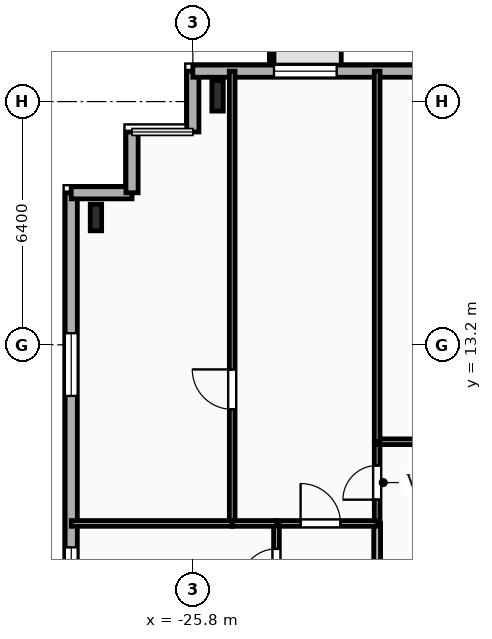
"""IFC4 building model, lengths in metres.
Left out: names, types, materials, properties, quantities, classifications, styles, units other than length and angle.
Written with IfcOpenShell. Run it as: python <this file> out.ifc"""

import sys

from ifc_helpers import new_model, si_unit, direction, frame, frame_2d, origin, origin_2d, place, context, subcontext, project, spatial, rectangle, i_section, extrude, element, fill, save


model = new_model("IFC4")
c1 = context("Model", 3, precision=1e-05, world=origin(), true_north=direction((0.0, 1.0)))
c2 = subcontext(c1, "Body", "Model", "MODEL_VIEW")
j1 = project(units=[si_unit("LENGTHUNIT", "METRE"), si_unit("PLANEANGLEUNIT", "RADIAN")], contexts=[c1])
p1 = place(None, origin())
s1 = spatial("IfcSite", under=j1, at=p1, CompositionType="ELEMENT")
p2 = place(p1, origin())
s2 = spatial("IfcBuilding", under=s1, at=p2, CompositionType="ELEMENT")
p3 = place(p2, frame((0.0, 0.0, 171.2)))
s3 = spatial("IfcBuildingStorey", under=s2, at=p3, CompositionType="ELEMENT", Elevation=171.2)
p4 = place(p3, frame((-25.15, 19.75, 0.0), z_axis=(0.0, 0.0, 1.0), x_axis=(1.0, 0.0, 0.0)))
e1 = element("IfcColumn", 1, at=p4, inside=s3, PredefinedType="COLUMN", context=c2, shape_type="SweptSolid", body=[
    extrude(i_section(OverallWidth=0.3, OverallDepth=0.8, WebThickness=0.018, FlangeThickness=0.033, FilletRadius=0.03, at=origin_2d()), origin(), (0.0, 0.0, 1.0), 3.35),
])
p5 = place(p3, frame((-28.35, 16.55, 0.0), z_axis=(0.0, 0.0, 1.0), x_axis=(1.0, 0.0, 0.0)))
e2 = element("IfcColumn", 2, at=p5, inside=s3, PredefinedType="COLUMN", context=c2, shape_type="SweptSolid", body=[
    extrude(i_section(OverallWidth=0.3, OverallDepth=0.7, WebThickness=0.017, FlangeThickness=0.032, FilletRadius=0.027, at=origin_2d()), origin(), (0.0, 0.0, 1.0), 3.35),
])
p6 = place(p3, frame((-29.0, -12.4, 0.0), z_axis=(0.0, 0.0, 1.0), x_axis=(0.0, 1.0, 0.0)))
e3 = element("IfcWall", 3, at=p6, inside=s3, PredefinedType="SOLIDWALL", context=c2, shape_type="SweptSolid", body=[
    extrude(rectangle(XDim=29.6, YDim=0.32, at=frame_2d((14.8, 0.0))), origin(), (0.0, 0.0, 1.0), 3.0),
])
p7 = place(p6, frame((2.855, 0.0, 0.85)))
e4 = element("IfcOpeningElement", 4, at=p7, cuts=e3, PredefinedType="OPENING", context=c2, shape_type="SweptSolid", body=[
    extrude(rectangle(XDim=1.65, YDim=1.85, at=frame_2d((0.825, 0.925))), frame((0.0, 0.17, 0.0), z_axis=(0.0, -1.0, 0.0), x_axis=(1.0, 0.0, 0.0)), (0.0, 0.0, 1.0), 0.34),
])
p8 = place(p6, frame((9.865, 0.0, 0.85)))
e5 = element("IfcOpeningElement", 5, at=p8, cuts=e3, PredefinedType="OPENING", context=c2, shape_type="SweptSolid", body=[
    extrude(rectangle(XDim=1.95, YDim=1.85, at=frame_2d((0.975, 0.925))), frame((0.0, 0.17, 0.0), z_axis=(0.0, -1.0, 0.0), x_axis=(1.0, 0.0, 0.0)), (0.0, 0.0, 1.0), 0.34),
])
p9 = place(p6, frame((13.13, 0.0, 0.85)))
e6 = element("IfcOpeningElement", 6, at=p9, cuts=e3, PredefinedType="OPENING", context=c2, shape_type="SweptSolid", body=[
    extrude(rectangle(XDim=1.5, YDim=1.85, at=frame_2d((0.75, 0.925))), frame((0.0, 0.17, 0.0), z_axis=(0.0, -1.0, 0.0), x_axis=(1.0, 0.0, 0.0)), (0.0, 0.0, 1.0), 0.34),
])
p10 = place(p6, frame((15.93, 0.0, 0.85)))
e7 = element("IfcOpeningElement", 7, at=p10, cuts=e3, PredefinedType="OPENING", context=c2, shape_type="SweptSolid", body=[
    extrude(rectangle(XDim=1.5, YDim=1.85, at=frame_2d((0.75, 0.925))), frame((0.0, 0.17, 0.0), z_axis=(0.0, -1.0, 0.0), x_axis=(1.0, 0.0, 0.0)), (0.0, 0.0, 1.0), 0.34),
])
p11 = place(p6, frame((18.77, 0.0, 0.85)))
e8 = element("IfcOpeningElement", 8, at=p11, cuts=e3, PredefinedType="OPENING", context=c2, shape_type="SweptSolid", body=[
    extrude(rectangle(XDim=1.5, YDim=1.85, at=frame_2d((0.75, 0.925))), frame((0.0, 0.17, 0.0), z_axis=(0.0, -1.0, 0.0), x_axis=(1.0, 0.0, 0.0)), (0.0, 0.0, 1.0), 0.34),
])
p12 = place(p6, frame((24.255, 0.0, 0.85)))
e9 = element("IfcOpeningElement", 9, at=p12, cuts=e3, PredefinedType="OPENING", context=c2, shape_type="SweptSolid", body=[
    extrude(rectangle(XDim=1.65, YDim=1.85, at=frame_2d((0.825, 0.925))), frame((0.0, 0.17, 0.0), z_axis=(0.0, -1.0, 0.0), x_axis=(1.0, 0.0, 0.0)), (0.0, 0.0, 1.0), 0.34),
])
for number, where, z_axis, x_axis in (
    (10, (-29.0, 17.2, 0.0), (0.0, 0.0, 1.0), (1.0, 0.0, 0.0)),
    (11, (-27.4, 17.2, 0.0), (0.0, 0.0, 1.0), (0.0, 1.0, 0.0)),
):
    element("IfcWall", number, at=place(p3, frame(where, z_axis=z_axis, x_axis=x_axis)), inside=s3, PredefinedType="SOLIDWALL", context=c2, shape_type="SweptSolid", body=[
        extrude(rectangle(XDim=1.6, YDim=0.32, at=frame_2d((0.8, 0.0))), origin(), (0.0, 0.0, 1.0), 3.0),
    ])
p13 = place(p3, frame((-25.8, 18.8, 0.0), z_axis=(0.0, 0.0, 1.0), x_axis=(0.0, 1.0, 0.0)))
e12 = element("IfcWall", 12, at=p13, inside=s3, PredefinedType="SOLIDWALL", context=c2, shape_type="SweptSolid", body=[
    extrude(rectangle(XDim=1.6, YDim=0.32, at=frame_2d((0.8, 0.0))), origin(), (0.0, 0.0, 1.0), 3.0),
])
p14 = place(p3, frame((-25.8, 20.4, 0.0), z_axis=(0.0, 0.0, 1.0), x_axis=(1.0, 0.0, 0.0)))
e13 = element("IfcWall", 13, at=p14, inside=s3, PredefinedType="SOLIDWALL", context=c2, shape_type="SweptSolid", body=[
    extrude(rectangle(XDim=49.6, YDim=0.32, at=frame_2d((24.8, 0.0))), origin(), (0.0, 0.0, 1.0), 3.0),
])
p15 = place(p14, frame((2.135, 0.0, 0.85)))
e14 = element("IfcOpeningElement", 14, at=p15, cuts=e13, PredefinedType="OPENING", context=c2, shape_type="SweptSolid", body=[
    extrude(rectangle(XDim=1.65, YDim=1.85, at=frame_2d((0.825, 0.925))), frame((0.0, 0.17, 0.0), z_axis=(0.0, -1.0, 0.0), x_axis=(1.0, 0.0, 0.0)), (0.0, 0.0, 1.0), 0.34),
])
p16 = place(p14, frame((6.295, 0.0, 0.85)))
e15 = element("IfcOpeningElement", 15, at=p16, cuts=e13, PredefinedType="OPENING", context=c2, shape_type="SweptSolid", body=[
    extrude(rectangle(XDim=1.65, YDim=1.85, at=frame_2d((0.825, 0.925))), frame((0.0, 0.17, 0.0), z_axis=(0.0, -1.0, 0.0), x_axis=(1.0, 0.0, 0.0)), (0.0, 0.0, 1.0), 0.34),
])
p17 = place(p14, frame((10.775, 0.0, 0.85)))
e16 = element("IfcOpeningElement", 16, at=p17, cuts=e13, PredefinedType="OPENING", context=c2, shape_type="SweptSolid", body=[
    extrude(rectangle(XDim=1.65, YDim=1.85, at=frame_2d((0.825, 0.925))), frame((0.0, 0.17, 0.0), z_axis=(0.0, -1.0, 0.0), x_axis=(1.0, 0.0, 0.0)), (0.0, 0.0, 1.0), 0.34),
])
p18 = place(p14, frame((18.49, 0.0, 0.85)))
e17 = element("IfcOpeningElement", 17, at=p18, cuts=e13, PredefinedType="OPENING", context=c2, shape_type="SweptSolid", body=[
    extrude(rectangle(XDim=1.5, YDim=1.85, at=frame_2d((0.75, 0.925))), frame((0.0, 0.17, 0.0), z_axis=(0.0, -1.0, 0.0), x_axis=(1.0, 0.0, 0.0)), (0.0, 0.0, 1.0), 0.34),
])
p19 = place(p14, frame((25.34, 0.0, 0.85)))
e18 = element("IfcOpeningElement", 18, at=p19, cuts=e13, PredefinedType="OPENING", context=c2, shape_type="SweptSolid", body=[
    extrude(rectangle(XDim=2.2, YDim=1.85, at=frame_2d((1.1, 0.925))), frame((0.0, 0.17, 0.0), z_axis=(0.0, -1.0, 0.0), x_axis=(1.0, 0.0, 0.0)), (0.0, 0.0, 1.0), 0.34),
])
p20 = place(p14, frame((33.74, 0.0, 0.85)))
e19 = element("IfcOpeningElement", 19, at=p20, cuts=e13, PredefinedType="OPENING", context=c2, shape_type="SweptSolid", body=[
    extrude(rectangle(XDim=2.2, YDim=1.85, at=frame_2d((1.1, 0.925))), frame((0.0, 0.17, 0.0), z_axis=(0.0, -1.0, 0.0), x_axis=(1.0, 0.0, 0.0)), (0.0, 0.0, 1.0), 0.34),
])
p21 = place(p14, frame((42.095, 0.0, 0.85)))
e20 = element("IfcOpeningElement", 20, at=p21, cuts=e13, PredefinedType="OPENING", context=c2, shape_type="SweptSolid", body=[
    extrude(rectangle(XDim=1.65, YDim=1.85, at=frame_2d((0.825, 0.925))), frame((0.0, 0.17, 0.0), z_axis=(0.0, -1.0, 0.0), x_axis=(1.0, 0.0, 0.0)), (0.0, 0.0, 1.0), 0.34),
])
p22 = place(p14, frame((47.45, 0.0, 0.85)))
e21 = element("IfcOpeningElement", 21, at=p22, cuts=e13, PredefinedType="OPENING", context=c2, shape_type="SweptSolid", body=[
    extrude(rectangle(XDim=1.1, YDim=1.85, at=frame_2d((0.55, 0.925))), frame((0.0, 0.17, 0.0), z_axis=(0.0, -1.0, 0.0), x_axis=(1.0, 0.0, 0.0)), (0.0, 0.0, 1.0), 0.34),
])
p23 = place(p3, frame((-20.95, 8.5, 0.0), z_axis=(0.0, 0.0, 1.0), x_axis=(0.0, 1.0, 0.0)))
e22 = element("IfcWall", 22, at=p23, inside=s3, PredefinedType="PARTITIONING", context=c2, shape_type="SweptSolid", body=[
    extrude(rectangle(XDim=2.15, YDim=0.15, at=frame_2d((1.075, 0.0))), origin(), (0.0, 0.0, 1.0), 3.0),
])
p24 = place(p23, frame((0.625, 0.0, 0.0)))
e23 = element("IfcOpeningElement", 23, at=p24, cuts=e22, PredefinedType="OPENING", context=c2, shape_type="SweptSolid", body=[
    extrude(rectangle(XDim=0.9, YDim=2.1, at=frame_2d((0.45, 1.05))), frame((0.0, 0.085, 0.0), z_axis=(0.0, -1.0, 0.0), x_axis=(1.0, 0.0, 0.0)), (0.0, 0.0, 1.0), 0.17),
])
p25 = place(p3, frame((-20.95, 10.65, 0.0), z_axis=(0.0, 0.0, 1.0), x_axis=(1.0, 0.0, 0.0)))
e24 = element("IfcWall", 24, at=p25, inside=s3, PredefinedType="PARTITIONING", context=c2, shape_type="SweptSolid", body=[
    extrude(rectangle(XDim=4.49, YDim=0.15, at=frame_2d((2.245, 0.0))), origin(), (0.0, 0.0, 1.0), 3.0),
])
p26 = place(p25, frame((2.575, 0.0, 0.0)))
e25 = element("IfcOpeningElement", 25, at=p26, cuts=e24, PredefinedType="OPENING", context=c2, shape_type="SweptSolid", body=[
    extrude(rectangle(XDim=1.05, YDim=2.15, at=frame_2d((0.525, 1.075))), frame((0.0, 0.085, 0.0), z_axis=(0.0, -1.0, 0.0), x_axis=(1.0, 0.0, 0.0)), (0.0, 0.0, 1.0), 0.17),
])
p27 = place(p3, frame((-20.95, -5.6, 0.0), z_axis=(0.0, 0.0, 1.0), x_axis=(0.0, 1.0, 0.0)))
e26 = element("IfcWall", 26, at=p27, inside=s3, PredefinedType="PARTITIONING", context=c2, shape_type="SweptSolid", body=[
    extrude(rectangle(XDim=14.1, YDim=0.18, at=frame_2d((7.05, 0.0))), origin(), (0.0, 0.0, 1.0), 3.0),
])
p28 = place(p27, frame((5.058, 0.0, 0.0)))
e27 = element("IfcOpeningElement", 27, at=p28, cuts=e26, PredefinedType="OPENING", context=c2, shape_type="SweptSolid", body=[
    extrude(rectangle(XDim=1.0, YDim=2.15, at=frame_2d((0.5, 1.075))), frame((0.0, 0.1, 0.0), z_axis=(0.0, -1.0, 0.0), x_axis=(1.0, 0.0, 0.0)), (0.0, 0.0, 1.0), 0.2),
])
p29 = place(p3, frame((-23.6, 8.5, 0.0), z_axis=(0.0, 0.0, 1.0), x_axis=(1.0, 0.0, 0.0)))
e28 = element("IfcWall", 28, at=p29, inside=s3, PredefinedType="PARTITIONING", context=c2, shape_type="SweptSolid", body=[
    extrude(rectangle(XDim=2.65, YDim=0.15, at=frame_2d((1.325, 0.0))), origin(), (0.0, 0.0, 1.0), 3.0),
])
p30 = place(p29, frame((0.635, 0.0, 0.0)))
e29 = element("IfcOpeningElement", 29, at=p30, cuts=e28, PredefinedType="OPENING", context=c2, shape_type="SweptSolid", body=[
    extrude(rectangle(XDim=1.05, YDim=2.15, at=frame_2d((0.525, 1.075))), frame((0.0, 0.085, 0.0), z_axis=(0.0, -1.0, 0.0), x_axis=(1.0, 0.0, 0.0)), (0.0, 0.0, 1.0), 0.17),
])
p31 = place(p3, frame((-23.6, 5.68, 0.0), z_axis=(0.0, 0.0, 1.0), x_axis=(0.0, 1.0, 0.0)))
e30 = element("IfcWall", 30, at=p31, inside=s3, PredefinedType="PARTITIONING", context=c2, shape_type="SweptSolid", body=[
    extrude(rectangle(XDim=2.82, YDim=0.15, at=frame_2d((1.41, 0.0))), origin(), (0.0, 0.0, 1.0), 2.655),
])
p32 = place(p31, frame((1.201, 0.0, 0.0)))
e31 = element("IfcOpeningElement", 31, at=p32, cuts=e30, PredefinedType="OPENING", context=c2, shape_type="SweptSolid", body=[
    extrude(rectangle(XDim=0.95, YDim=2.1, at=frame_2d((0.475, 1.05))), frame((0.0, 0.085, 0.0), z_axis=(0.0, -1.0, 0.0), x_axis=(1.0, 0.0, 0.0)), (0.0, 0.0, 1.0), 0.17),
])
p33 = place(p3, frame((-24.765, 8.5, 0.0), z_axis=(0.0, 0.0, 1.0), x_axis=(0.0, 1.0, 0.0)))
e32 = element("IfcWall", 32, at=p33, inside=s3, PredefinedType="PARTITIONING", context=c2, shape_type="SweptSolid", body=[
    extrude(rectangle(XDim=11.9, YDim=0.15, at=frame_2d((5.95, 0.0))), origin(), (0.0, 0.0, 1.0), 3.0),
])
p34 = place(p33, frame((3.002, 0.0, 0.0)))
e33 = element("IfcOpeningElement", 33, at=p34, cuts=e32, PredefinedType="OPENING", context=c2, shape_type="SweptSolid", body=[
    extrude(rectangle(XDim=1.05, YDim=2.15, at=frame_2d((0.525, 1.075))), frame((0.0, 0.085, 0.0), z_axis=(0.0, -1.0, 0.0), x_axis=(1.0, 0.0, 0.0)), (0.0, 0.0, 1.0), 0.17),
])
p35 = place(p3, frame((-23.6, 8.5, 0.0), z_axis=(0.0, 0.0, 1.0), x_axis=(-1.0, 0.0, 0.0)))
e34 = element("IfcWall", 34, at=p35, inside=s3, PredefinedType="PARTITIONING", context=c2, shape_type="SweptSolid", body=[
    extrude(rectangle(XDim=1.165, YDim=0.15, at=frame_2d((0.583, 0.0))), origin(), (0.0, 0.0, 1.0), 3.0),
])
p36 = place(p3, frame((-20.95, 20.4, 0.0), z_axis=(0.0, 0.0, 1.0), x_axis=(0.0, -1.0, 0.0)))
e35 = element("IfcWall", 35, at=p36, inside=s3, PredefinedType="PARTITIONING", context=c2, shape_type="SweptSolid", body=[
    extrude(rectangle(XDim=9.75, YDim=0.15, at=frame_2d((4.875, 0.0))), origin(), (0.0, 0.0, 1.0), 3.0),
])
p37 = place(p3, frame((-24.765, 8.5, 0.0), z_axis=(0.0, 0.0, 1.0), x_axis=(-1.0, 0.0, 0.0)))
e36 = element("IfcWall", 36, at=p37, inside=s3, PredefinedType="PARTITIONING", context=c2, shape_type="SweptSolid", body=[
    extrude(rectangle(XDim=4.235, YDim=0.15, at=frame_2d((2.118, 0.0))), origin(), (0.0, 0.0, 1.0), 3.0),
])
p38 = place(p11, origin())
e37 = element("IfcWindow", 37, at=p38, inside=s3, PartitioningType="SINGLE_PANEL", PredefinedType="WINDOW", context=c2, shape_type="SweptSolid", body=[
    extrude(rectangle(XDim=1.5, YDim=1.85, at=frame_2d((0.75, 0.925))), frame((0.0, 0.03, 0.0), z_axis=(0.0, -1.0, 0.0), x_axis=(1.0, 0.0, 0.0)), (0.0, 0.0, 1.0), 0.06),
])
fill(e8, e37)
p39 = place(p12, origin())
e38 = element("IfcWindow", 38, at=p39, inside=s3, PartitioningType="SINGLE_PANEL", PredefinedType="WINDOW", context=c2, shape_type="SweptSolid", body=[
    extrude(rectangle(XDim=1.65, YDim=1.85, at=frame_2d((0.825, 0.925))), frame((0.0, 0.03, 0.0), z_axis=(0.0, -1.0, 0.0), x_axis=(1.0, 0.0, 0.0)), (0.0, 0.0, 1.0), 0.06),
])
fill(e9, e38)
p40 = place(p15, origin())
e39 = element("IfcWindow", 39, at=p40, inside=s3, PartitioningType="SINGLE_PANEL", PredefinedType="WINDOW", context=c2, shape_type="SweptSolid", body=[
    extrude(rectangle(XDim=1.65, YDim=1.85, at=frame_2d((0.825, 0.925))), frame((0.0, 0.03, 0.0), z_axis=(0.0, -1.0, 0.0), x_axis=(1.0, 0.0, 0.0)), (0.0, 0.0, 1.0), 0.06),
])
fill(e14, e39)
p41 = place(p24, origin())
e40 = element("IfcDoor", 40, at=p41, inside=s3, OperationType="SINGLE_SWING_LEFT", PredefinedType="DOOR", context=c2, shape_type="SweptSolid", body=[
    extrude(rectangle(XDim=0.9, YDim=2.1, at=frame_2d((0.45, 1.05))), frame((0.0, 0.025, 0.0), z_axis=(0.0, -1.0, 0.0), x_axis=(1.0, 0.0, 0.0)), (0.0, 0.0, 1.0), 0.05),
])
fill(e23, e40)
p42 = place(p30, origin())
e41 = element("IfcDoor", 41, at=p42, inside=s3, OperationType="SINGLE_SWING_LEFT", PredefinedType="DOOR", context=c2, shape_type="SweptSolid", body=[
    extrude(rectangle(XDim=1.05, YDim=2.15, at=frame_2d((0.525, 1.075))), frame((0.0, 0.025, 0.0), z_axis=(0.0, -1.0, 0.0), x_axis=(1.0, 0.0, 0.0)), (0.0, 0.0, 1.0), 0.05),
])
fill(e29, e41)
p43 = place(p32, origin())
e42 = element("IfcDoor", 42, at=p43, inside=s3, OperationType="SINGLE_SWING_LEFT", PredefinedType="DOOR", context=c2, shape_type="SweptSolid", body=[
    extrude(rectangle(XDim=0.95, YDim=2.1, at=frame_2d((0.475, 1.05))), frame((0.0, 0.025, 0.0), z_axis=(0.0, -1.0, 0.0), x_axis=(1.0, 0.0, 0.0)), (0.0, 0.0, 1.0), 0.05),
])
fill(e31, e42)
p44 = place(p34, origin())
e43 = element("IfcDoor", 43, at=p44, inside=s3, OperationType="SINGLE_SWING_RIGHT", PredefinedType="DOOR", context=c2, shape_type="SweptSolid", body=[
    extrude(rectangle(XDim=1.05, YDim=2.15, at=frame_2d((0.525, 1.075))), frame((0.0, 0.025, 0.0), z_axis=(0.0, -1.0, 0.0), x_axis=(1.0, 0.0, 0.0)), (0.0, 0.0, 1.0), 0.05),
])
fill(e33, e43)
save(model, sys.argv[1])
